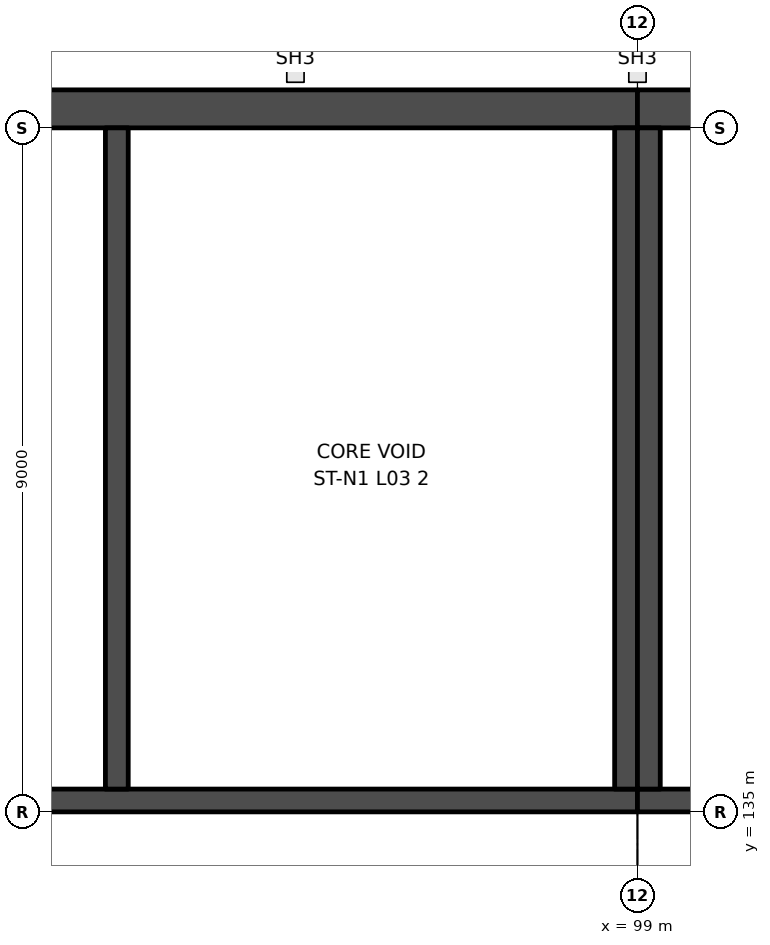
"""IFC4 building model, lengths in metres.
Left out: names, types, materials, properties, quantities, classifications, styles, units other than length and angle.
Written with IfcOpenShell. Run it as: python <this file> out.ifc"""

import sys

from ifc_helpers import new_model, si_unit, direction, frame, frame_2d, origin, place, context, subcontext, project, spatial, rectangle, extrude, element, save


model = new_model("IFC4")
c1 = context("Model", 3, precision=1e-05, world=origin(), true_north=direction((0.0, 1.0)))
c2 = subcontext(c1, "Body", "Model", "MODEL_VIEW")
j1 = project(units=[si_unit("LENGTHUNIT", "METRE"), si_unit("PLANEANGLEUNIT", "RADIAN")], contexts=[c1])
p1 = place(None, origin())
s1 = spatial("IfcSite", under=j1, at=p1, CompositionType="ELEMENT")
p2 = place(p1, origin())
s2 = spatial("IfcBuilding", under=s1, at=p2, CompositionType="ELEMENT")
p3 = place(p2, frame((0.0, 0.0, 22.0)))
s3 = spatial("IfcBuildingStorey", under=s2, at=p3, CompositionType="ELEMENT", Elevation=22.0)
p4 = place(p3, frame((81.0, 135.15, 0.0), z_axis=(0.0, 0.0, 1.0), x_axis=(1.0, 0.0, 0.0)))
e1 = element("IfcWall", 1, at=p4, inside=s3, PredefinedType="SHEAR", context=c2, shape_type="SweptSolid", body=[
    extrude(rectangle(XDim=18.0, YDim=0.3, at=frame_2d((9.0, 0.0))), origin(), (0.0, 0.0, 1.0), 6.0),
])
p5 = place(p4, frame((1.5, 0.0, 0.0)))
e2 = element("IfcOpeningElement", 2, at=p5, cuts=e1, PredefinedType="OPENING", context=c2, shape_type="SweptSolid", body=[
    extrude(rectangle(XDim=1.2, YDim=2.1, at=frame_2d((0.6, 1.05))), frame((0.0, 0.16, 0.0), z_axis=(0.0, -1.0, 0.0), x_axis=(1.0, 0.0, 0.0)), (0.0, 0.0, 1.0), 0.32),
])
p6 = place(p3, frame((81.0, 144.25, 0.0), z_axis=(0.0, 0.0, 1.0), x_axis=(1.0, 0.0, 0.0)))
e3 = element("IfcWall", 3, at=p6, inside=s3, PredefinedType="SHEAR", context=c2, shape_type="SweptSolid", body=[
    extrude(rectangle(XDim=18.0, YDim=0.5, at=frame_2d((9.0, 0.0))), origin(), (0.0, 0.0, 1.0), 6.0),
])
for number, where, z_axis, x_axis in (
    (4, (98.85, 135.3, 0.0), (0.0, 0.0, 1.0), (0.0, 1.0, 0.0)),
    (5, (92.15, 135.3, 0.0), (0.0, 0.0, 1.0), (0.0, 1.0, 0.0)),
):
    element("IfcWall", number, at=place(p3, frame(where, z_axis=z_axis, x_axis=x_axis)), inside=s3, PredefinedType="SHEAR", context=c2, shape_type="SweptSolid", body=[
        extrude(rectangle(XDim=8.7, YDim=0.3, at=frame_2d((4.35, 0.0))), origin(), (0.0, 0.0, 1.0), 6.0),
    ])
p7 = place(p3, frame((117.0, 135.15, 0.0), z_axis=(0.0, 0.0, 1.0), x_axis=(-1.0, 0.0, 0.0)))
e6 = element("IfcWall", 6, at=p7, inside=s3, PredefinedType="SHEAR", context=c2, shape_type="SweptSolid", body=[
    extrude(rectangle(XDim=18.0, YDim=0.3, at=frame_2d((9.0, 0.0))), origin(), (0.0, 0.0, 1.0), 6.0),
])
p8 = place(p7, frame((8.6, 0.0, 0.0)))
e7 = element("IfcOpeningElement", 7, at=p8, cuts=e6, PredefinedType="OPENING", context=c2, shape_type="SweptSolid", body=[
    extrude(rectangle(XDim=1.2, YDim=2.1, at=frame_2d((0.6, 1.05))), frame((0.0, 0.16, 0.0), z_axis=(0.0, -1.0, 0.0), x_axis=(1.0, 0.0, 0.0)), (0.0, 0.0, 1.0), 0.32),
])
p9 = place(p3, frame((117.0, 144.25, 0.0), z_axis=(0.0, 0.0, 1.0), x_axis=(-1.0, 0.0, 0.0)))
e8 = element("IfcWall", 8, at=p9, inside=s3, PredefinedType="SHEAR", context=c2, shape_type="SweptSolid", body=[
    extrude(rectangle(XDim=18.0, YDim=0.5, at=frame_2d((9.0, 0.0))), origin(), (0.0, 0.0, 1.0), 6.0),
])
p10 = place(p3, frame((99.15, 135.3, 0.0), z_axis=(0.0, 0.0, 1.0), x_axis=(0.0, 1.0, 0.0)))
e9 = element("IfcWall", 9, at=p10, inside=s3, PredefinedType="SHEAR", context=c2, shape_type="SweptSolid", body=[
    extrude(rectangle(XDim=8.7, YDim=0.3, at=frame_2d((4.35, 0.0))), origin(), (0.0, 0.0, 1.0), 6.0),
])
save(model, sys.argv[1])
